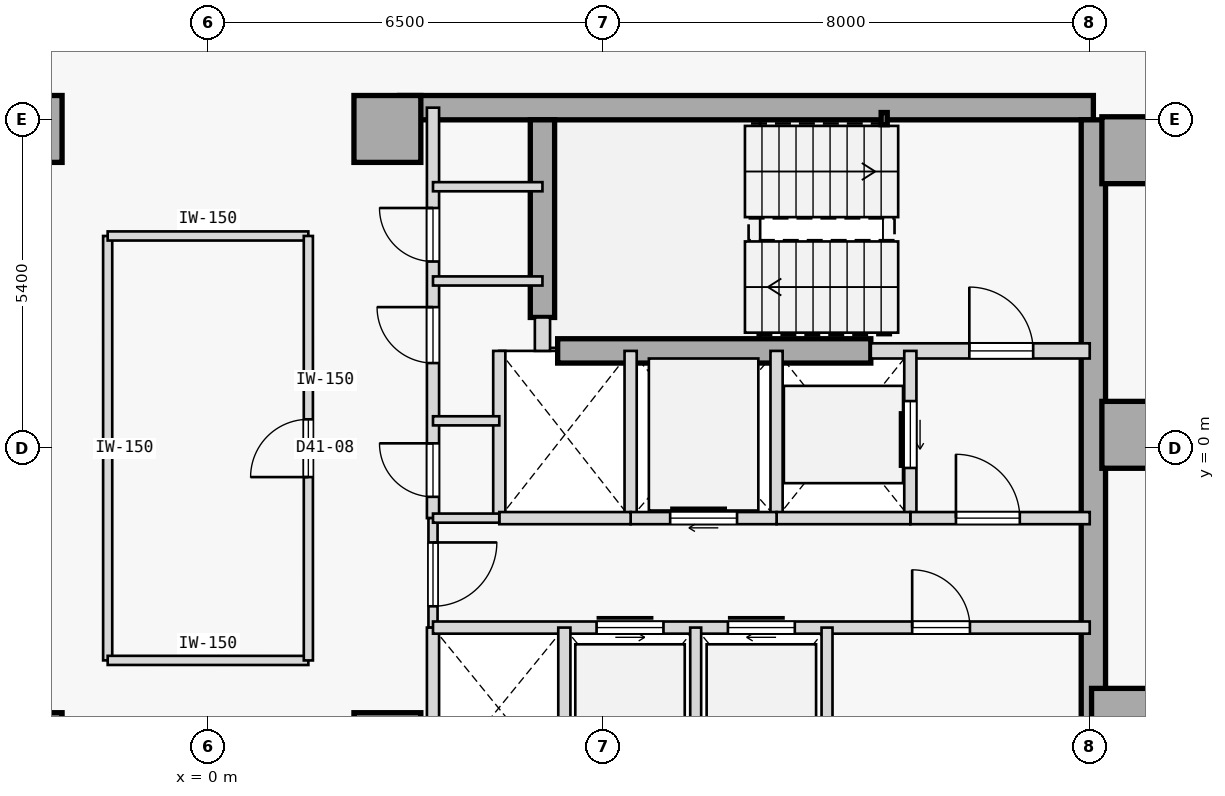
"""IFC4 building model, lengths in metres.
Left out: names, types, materials, properties, quantities, classifications, styles, units other than length and angle.
Written with IfcOpenShell. Run it as: python <this file> out.ifc"""

import sys

from ifc_helpers import new_model, si_unit, direction, frame, frame_2d, origin, origin_2d, place, context, subcontext, project, spatial, rectangle, hollow_rectangle, extrude, element, fill, save


model = new_model("IFC4")
c1 = context("Model", 3, precision=1e-05, world=origin(), true_north=direction((0.0, 1.0)))
c2 = subcontext(c1, "Body", "Model", "MODEL_VIEW")
j1 = project(units=[si_unit("LENGTHUNIT", "METRE"), si_unit("PLANEANGLEUNIT", "RADIAN")], contexts=[c1])
p1 = place(None, origin())
s1 = spatial("IfcSite", under=j1, at=p1, CompositionType="ELEMENT")
p2 = place(p1, origin())
s2 = spatial("IfcBuilding", under=s1, at=p2, CompositionType="ELEMENT")
p3 = place(p2, frame((0.0, 0.0, 161.6)))
s3 = spatial("IfcBuildingStorey", under=s2, at=p3, CompositionType="ELEMENT", Elevation=161.6)
for number, where, z_axis, x_axis in (
    (1, (-2.95, -4.9, 0.0), (0.0, 0.0, 1.0), (1.0, 0.0, 0.0)),
    (2, (-2.95, 5.25, 0.0), (0.0, 0.0, 1.0), (1.0, 0.0, 0.0)),
    (3, (15.25, 4.9, 0.0), (0.0, 0.0, 1.0), (1.0, 0.0, 0.0)),
    (4, (15.25, 0.22, 0.0), (0.0, 0.0, 1.0), (1.0, 0.0, 0.0)),
    (5, (15.08, -4.5, 0.0), (0.0, 0.0, 1.0), (1.0, 0.0, 0.0)),
    (6, (2.95, -4.9, 0.0), (0.0, 0.0, 1.0), (1.0, 0.0, 0.0)),
    (7, (2.95, 5.25, 0.0), (0.0, 0.0, 1.0), (1.0, 0.0, 0.0)),
):
    element("IfcColumn", number, at=place(p3, frame(where, z_axis=z_axis, x_axis=x_axis)), inside=s3, PredefinedType="COLUMN", context=c2, shape_type="SweptSolid", body=[
        extrude(rectangle(XDim=1.1, YDim=1.1, at=origin_2d()), origin(), (0.0, 0.0, 1.0), 3.4),
    ])
p4 = place(p3, frame((3.15, 5.6, 0.0), z_axis=(0.0, 0.0, 1.0), x_axis=(1.0, 0.0, 0.0)))
e8 = element("IfcWall", 8, at=p4, inside=s3, PredefinedType="SHEAR", context=c2, shape_type="SweptSolid", body=[
    extrude(rectangle(XDim=11.41, YDim=0.4, at=frame_2d((5.705, 0.0))), origin(), (0.0, 0.0, 1.0), 3.175),
])
p5 = place(p3, frame((14.56, -5.4, 0.0), z_axis=(0.0, 0.0, 1.0), x_axis=(0.0, 1.0, 0.0)))
e9 = element("IfcWall", 9, at=p5, inside=s3, PredefinedType="SHEAR", context=c2, shape_type="SweptSolid", body=[
    extrude(rectangle(XDim=10.8, YDim=0.4, at=frame_2d((5.4, 0.0))), origin(), (0.0, 0.0, 1.0), 3.175),
])
p6 = place(p3, frame((5.5, 2.15, 0.0), z_axis=(0.0, 0.0, 1.0), x_axis=(0.0, 1.0, 0.0)))
e10 = element("IfcWall", 10, at=p6, inside=s3, PredefinedType="SHEAR", context=c2, shape_type="SweptSolid", body=[
    extrude(rectangle(XDim=3.25, YDim=0.4, at=frame_2d((1.625, 0.0))), origin(), (0.0, 0.0, 1.0), 3.175),
])
p7 = place(p3, frame((5.75, 1.6, 0.0), z_axis=(0.0, 0.0, 1.0), x_axis=(1.0, 0.0, 0.0)))
e11 = element("IfcWall", 11, at=p7, inside=s3, PredefinedType="SHEAR", context=c2, shape_type="SweptSolid", body=[
    extrude(rectangle(XDim=5.15, YDim=0.4, at=frame_2d((2.575, 0.0))), origin(), (0.0, 0.0, 1.0), 3.175),
])
p8 = place(p3, frame((11.12, 5.42, 0.0), z_axis=(0.0, 0.0, 1.0), x_axis=(1.0, 0.0, 0.0)))
e12 = element("IfcColumn", 12, at=p8, inside=s3, PredefinedType="COLUMN", context=c2, shape_type="SweptSolid", body=[
    extrude(hollow_rectangle(XDim=0.1, YDim=0.2, WallThickness=0.008, at=origin_2d()), origin(), (0.0, 0.0, 1.0), 3.4),
])
p9 = place(p3, frame((10.9, 1.6, 0.0), z_axis=(0.0, 0.0, 1.0), x_axis=(1.0, 0.0, 0.0)))
e13 = element("IfcWall", 13, at=p9, inside=s3, PredefinedType="STANDARD", context=c2, shape_type="SweptSolid", body=[
    extrude(rectangle(XDim=3.6, YDim=0.25, at=frame_2d((1.8, 0.0))), origin(), (0.0, 0.0, 1.0), 3.175),
])
p10 = place(p9, frame((1.62, 0.0, 0.0)))
e14 = element("IfcOpeningElement", 14, at=p10, cuts=e13, PredefinedType="OPENING", context=c2, shape_type="SweptSolid", body=[
    extrude(rectangle(XDim=1.05, YDim=2.15, at=frame_2d((0.525, 1.075))), frame((0.0, 0.135, 0.0), z_axis=(0.0, -1.0, 0.0), x_axis=(1.0, 0.0, 0.0)), (0.0, 0.0, 1.0), 0.27),
])
p11 = place(p3, frame((5.5, 1.6, 0.0), z_axis=(0.0, 0.0, 1.0), x_axis=(0.0, 1.0, 0.0)))
e15 = element("IfcWall", 15, at=p11, inside=s3, PredefinedType="STANDARD", context=c2, shape_type="SweptSolid", body=[
    extrude(rectangle(XDim=0.55, YDim=0.25, at=frame_2d((0.275, 0.0))), origin(), (0.0, 0.0, 1.0), 3.175),
])
p12 = place(p3, frame((3.7, -1.15, 0.0), z_axis=(0.0, 0.0, 1.0), x_axis=(0.0, 1.0, 0.0)))
e16 = element("IfcWall", 16, at=p12, inside=s3, PredefinedType="STANDARD", context=c2, shape_type="SweptSolid", body=[
    extrude(rectangle(XDim=6.75, YDim=0.2, at=frame_2d((3.375, 0.0))), origin(), (0.0, 0.0, 1.0), 3.175),
])
p13 = place(p12, frame((0.35, 0.0, 0.0)))
e17 = element("IfcOpeningElement", 17, at=p13, cuts=e16, PredefinedType="OPENING", context=c2, shape_type="SweptSolid", body=[
    extrude(rectangle(XDim=0.88, YDim=2.15, at=frame_2d((0.44, 1.075))), frame((0.0, 0.11, 0.0), z_axis=(0.0, -1.0, 0.0), x_axis=(1.0, 0.0, 0.0)), (0.0, 0.0, 1.0), 0.22),
])
p14 = place(p12, frame((2.55, 0.0, 0.0)))
e18 = element("IfcOpeningElement", 18, at=p14, cuts=e16, PredefinedType="OPENING", context=c2, shape_type="SweptSolid", body=[
    extrude(rectangle(XDim=0.92, YDim=2.15, at=frame_2d((0.46, 1.075))), frame((0.0, 0.11, 0.0), z_axis=(0.0, -1.0, 0.0), x_axis=(1.0, 0.0, 0.0)), (0.0, 0.0, 1.0), 0.22),
])
p15 = place(p12, frame((4.22, 0.0, 0.0)))
e19 = element("IfcOpeningElement", 19, at=p15, cuts=e16, PredefinedType="OPENING", context=c2, shape_type="SweptSolid", body=[
    extrude(rectangle(XDim=0.88, YDim=2.15, at=frame_2d((0.44, 1.075))), frame((0.0, 0.11, 0.0), z_axis=(0.0, -1.0, 0.0), x_axis=(1.0, 0.0, 0.0)), (0.0, 0.0, 1.0), 0.22),
])
p16 = place(p3, frame((3.7, -2.95, 0.0), z_axis=(0.0, 0.0, 1.0), x_axis=(0.0, 1.0, 0.0)))
e20 = element("IfcWall", 20, at=p16, inside=s3, PredefinedType="PARTITIONING", context=c2, shape_type="SweptSolid", body=[
    extrude(rectangle(XDim=1.8, YDim=0.15, at=frame_2d((0.9, 0.0))), origin(), (0.0, 0.0, 1.0), 3.175),
])
p17 = place(p16, frame((0.35, 0.0, 0.0)))
e21 = element("IfcOpeningElement", 21, at=p17, cuts=e20, PredefinedType="OPENING", context=c2, shape_type="SweptSolid", body=[
    extrude(rectangle(XDim=1.05, YDim=2.18, at=frame_2d((0.525, 1.09))), frame((0.0, 0.085, 0.0), z_axis=(0.0, -1.0, 0.0), x_axis=(1.0, 0.0, 0.0)), (0.0, 0.0, 1.0), 0.17),
])
p18 = place(p3, frame((3.7, -5.6, 0.0), z_axis=(0.0, 0.0, 1.0), x_axis=(0.0, 1.0, 0.0)))
e22 = element("IfcWall", 22, at=p18, inside=s3, PredefinedType="STANDARD", context=c2, shape_type="SweptSolid", body=[
    extrude(rectangle(XDim=2.65, YDim=0.2, at=frame_2d((1.325, 0.0))), origin(), (0.0, 0.0, 1.0), 3.175),
])
p19 = place(p3, frame((11.55, -1.15, 0.0), z_axis=(0.0, 0.0, 1.0), x_axis=(0.0, 1.0, 0.0)))
e23 = element("IfcWall", 23, at=p19, inside=s3, PredefinedType="STANDARD", context=c2, shape_type="SweptSolid", body=[
    extrude(rectangle(XDim=2.75, YDim=0.2, at=frame_2d((1.375, 0.0))), origin(), (0.0, 0.0, 1.0), 3.175),
])
p20 = place(p19, frame((0.825, 0.0, 0.0)))
e24 = element("IfcOpeningElement", 24, at=p20, cuts=e23, PredefinedType="OPENING", context=c2, shape_type="SweptSolid", body=[
    extrude(rectangle(XDim=1.1, YDim=2.15, at=frame_2d((0.55, 1.075))), frame((0.0, 0.11, 0.0), z_axis=(0.0, -1.0, 0.0), x_axis=(1.0, 0.0, 0.0)), (0.0, 0.0, 1.0), 0.22),
])
p21 = place(p3, frame((9.35, -1.15, 0.0), z_axis=(0.0, 0.0, 1.0), x_axis=(0.0, 1.0, 0.0)))
e25 = element("IfcWall", 25, at=p21, inside=s3, PredefinedType="STANDARD", context=c2, shape_type="SweptSolid", body=[
    extrude(rectangle(XDim=2.75, YDim=0.2, at=frame_2d((1.375, 0.0))), origin(), (0.0, 0.0, 1.0), 3.175),
])
p22 = place(p3, frame((11.55, -1.15, 0.0), z_axis=(0.0, 0.0, 1.0), x_axis=(1.0, 0.0, 0.0)))
e26 = element("IfcWall", 26, at=p22, inside=s3, PredefinedType="STANDARD", context=c2, shape_type="SweptSolid", body=[
    extrude(rectangle(XDim=2.95, YDim=0.2, at=frame_2d((1.475, 0.0))), origin(), (0.0, 0.0, 1.0), 3.175),
])
p23 = place(p22, frame((0.75, 0.0, 0.0)))
e27 = element("IfcOpeningElement", 27, at=p23, cuts=e26, PredefinedType="OPENING", context=c2, shape_type="SweptSolid", body=[
    extrude(rectangle(XDim=1.05, YDim=2.18, at=frame_2d((0.525, 1.09))), frame((0.0, 0.11, 0.0), z_axis=(0.0, -1.0, 0.0), x_axis=(1.0, 0.0, 0.0)), (0.0, 0.0, 1.0), 0.22),
])
p24 = place(p3, frame((9.35, -1.15, 0.0), z_axis=(0.0, 0.0, 1.0), x_axis=(1.0, 0.0, 0.0)))
e28 = element("IfcWall", 28, at=p24, inside=s3, PredefinedType="STANDARD", context=c2, shape_type="SweptSolid", body=[
    extrude(rectangle(XDim=2.2, YDim=0.2, at=frame_2d((1.1, 0.0))), origin(), (0.0, 0.0, 1.0), 3.175),
])
p25 = place(p3, frame((6.95, -1.15, 0.0), z_axis=(0.0, 0.0, 1.0), x_axis=(0.0, 1.0, 0.0)))
e29 = element("IfcWall", 29, at=p25, inside=s3, PredefinedType="STANDARD", context=c2, shape_type="SweptSolid", body=[
    extrude(rectangle(XDim=2.75, YDim=0.2, at=frame_2d((1.375, 0.0))), origin(), (0.0, 0.0, 1.0), 3.175),
])
p26 = place(p3, frame((6.95, -1.15, 0.0), z_axis=(0.0, 0.0, 1.0), x_axis=(1.0, 0.0, 0.0)))
e30 = element("IfcWall", 30, at=p26, inside=s3, PredefinedType="STANDARD", context=c2, shape_type="SweptSolid", body=[
    extrude(rectangle(XDim=2.4, YDim=0.2, at=frame_2d((1.2, 0.0))), origin(), (0.0, 0.0, 1.0), 3.175),
])
p27 = place(p26, frame((0.65, 0.0, 0.0)))
e31 = element("IfcOpeningElement", 31, at=p27, cuts=e30, PredefinedType="OPENING", context=c2, shape_type="SweptSolid", body=[
    extrude(rectangle(XDim=1.1, YDim=2.15, at=frame_2d((0.55, 1.075))), frame((0.0, 0.11, 0.0), z_axis=(0.0, -1.0, 0.0), x_axis=(1.0, 0.0, 0.0)), (0.0, 0.0, 1.0), 0.22),
])
p28 = place(p3, frame((4.79, -1.15, 0.0), z_axis=(0.0, 0.0, 1.0), x_axis=(0.0, 1.0, 0.0)))
e32 = element("IfcWall", 32, at=p28, inside=s3, PredefinedType="STANDARD", context=c2, shape_type="SweptSolid", body=[
    extrude(rectangle(XDim=2.75, YDim=0.2, at=frame_2d((1.375, 0.0))), origin(), (0.0, 0.0, 1.0), 3.175),
])
p29 = place(p3, frame((4.79, -1.15, 0.0), z_axis=(0.0, 0.0, 1.0), x_axis=(1.0, 0.0, 0.0)))
e33 = element("IfcWall", 33, at=p29, inside=s3, PredefinedType="STANDARD", context=c2, shape_type="SweptSolid", body=[
    extrude(rectangle(XDim=2.16, YDim=0.2, at=frame_2d((1.08, 0.0))), origin(), (0.0, 0.0, 1.0), 3.175),
])
p30 = place(p3, frame((3.7, -1.15, 0.0), z_axis=(0.0, 0.0, 1.0), x_axis=(1.0, 0.0, 0.0)))
e34 = element("IfcWall", 34, at=p30, inside=s3, PredefinedType="PARTITIONING", context=c2, shape_type="SweptSolid", body=[
    extrude(rectangle(XDim=1.09, YDim=0.15, at=frame_2d((0.545, 0.0))), origin(), (0.0, 0.0, 1.0), 3.175),
])
p31 = place(p3, frame((3.7, -2.95, 0.0), z_axis=(0.0, 0.0, 1.0), x_axis=(1.0, 0.0, 0.0)))
e35 = element("IfcWall", 35, at=p31, inside=s3, PredefinedType="STANDARD", context=c2, shape_type="SweptSolid", body=[
    extrude(rectangle(XDim=10.8, YDim=0.2, at=frame_2d((5.4, 0.0))), origin(), (0.0, 0.0, 1.0), 3.175),
])
p32 = place(p31, frame((2.69, 0.0, 0.0)))
e36 = element("IfcOpeningElement", 36, at=p32, cuts=e35, PredefinedType="OPENING", context=c2, shape_type="SweptSolid", body=[
    extrude(rectangle(XDim=1.1, YDim=2.15, at=frame_2d((0.55, 1.075))), frame((0.0, 0.11, 0.0), z_axis=(0.0, -1.0, 0.0), x_axis=(1.0, 0.0, 0.0)), (0.0, 0.0, 1.0), 0.22),
])
p33 = place(p31, frame((4.85, 0.0, 0.0)))
e37 = element("IfcOpeningElement", 37, at=p33, cuts=e35, PredefinedType="OPENING", context=c2, shape_type="SweptSolid", body=[
    extrude(rectangle(XDim=1.1, YDim=2.15, at=frame_2d((0.55, 1.075))), frame((0.0, 0.11, 0.0), z_axis=(0.0, -1.0, 0.0), x_axis=(1.0, 0.0, 0.0)), (0.0, 0.0, 1.0), 0.22),
])
p34 = place(p31, frame((7.88, 0.0, 0.0)))
e38 = element("IfcOpeningElement", 38, at=p34, cuts=e35, PredefinedType="OPENING", context=c2, shape_type="SweptSolid", body=[
    extrude(rectangle(XDim=0.95, YDim=2.15, at=frame_2d((0.475, 1.075))), frame((0.0, 0.11, 0.0), z_axis=(0.0, -1.0, 0.0), x_axis=(1.0, 0.0, 0.0)), (0.0, 0.0, 1.0), 0.22),
])
p35 = place(p3, frame((5.86, -5.6, 0.0), z_axis=(0.0, 0.0, 1.0), x_axis=(0.0, 1.0, 0.0)))
e39 = element("IfcWall", 39, at=p35, inside=s3, PredefinedType="STANDARD", context=c2, shape_type="SweptSolid", body=[
    extrude(rectangle(XDim=2.65, YDim=0.2, at=frame_2d((1.325, 0.0))), origin(), (0.0, 0.0, 1.0), 3.175),
])
for number, where, z_axis, x_axis in (
    (40, (10.18, -5.6, 0.0), (0.0, 0.0, 1.0), (0.0, 1.0, 0.0)),
    (41, (8.02, -5.6, 0.0), (0.0, 0.0, 1.0), (0.0, 1.0, 0.0)),
):
    element("IfcWall", number, at=place(p3, frame(where, z_axis=z_axis, x_axis=x_axis)), inside=s3, PredefinedType="STANDARD", context=c2, shape_type="SweptSolid", body=[
        extrude(rectangle(XDim=2.65, YDim=0.18, at=frame_2d((1.325, 0.0))), origin(), (0.0, 0.0, 1.0), 3.175),
    ])
p36 = place(p3, frame((3.7, 4.3, 0.0), z_axis=(0.0, 0.0, 1.0), x_axis=(1.0, 0.0, 0.0)))
e42 = element("IfcWall", 42, at=p36, inside=s3, PredefinedType="PARTITIONING", context=c2, shape_type="SweptSolid", body=[
    extrude(rectangle(XDim=1.8, YDim=0.15, at=frame_2d((0.9, 0.0))), origin(), (0.0, 0.0, 1.0), 3.175),
])
p37 = place(p3, frame((3.7, 0.45, 0.0), z_axis=(0.0, 0.0, 1.0), x_axis=(1.0, 0.0, 0.0)))
e43 = element("IfcWall", 43, at=p37, inside=s3, PredefinedType="PARTITIONING", context=c2, shape_type="SweptSolid", body=[
    extrude(rectangle(XDim=1.09, YDim=0.15, at=frame_2d((0.545, 0.0))), origin(), (0.0, 0.0, 1.0), 3.175),
])
p38 = place(p3, frame((3.7, 2.75, 0.0), z_axis=(0.0, 0.0, 1.0), x_axis=(1.0, 0.0, 0.0)))
e44 = element("IfcWall", 44, at=p38, inside=s3, PredefinedType="PARTITIONING", context=c2, shape_type="SweptSolid", body=[
    extrude(rectangle(XDim=1.8, YDim=0.15, at=frame_2d((0.9, 0.0))), origin(), (0.0, 0.0, 1.0), 3.175),
])
p39 = place(p3, frame((-1.65, -3.49, 0.0), z_axis=(0.0, 0.0, 1.0), x_axis=(-3.4979712e-05, 0.999999999388, 0.0)))
e45 = element("IfcWall", 45, at=p39, inside=s3, PredefinedType="PARTITIONING", context=c2, shape_type="SweptSolid", body=[
    extrude(rectangle(XDim=6.979, YDim=0.15, at=frame_2d((3.49, 0.0))), origin(), (0.0, 0.0, 1.0), 3.175),
])
p40 = place(p3, frame((-1.65, -3.49, 0.0), z_axis=(0.0, 0.0, 1.0), x_axis=(0.999999975374, -0.000221926315, 0.0)))
e46 = element("IfcWall", 46, at=p40, inside=s3, PredefinedType="PARTITIONING", context=c2, shape_type="SweptSolid", body=[
    extrude(rectangle(XDim=3.3, YDim=0.15, at=frame_2d((1.65, 0.0))), origin(), (0.0, 0.0, 1.0), 3.175),
])
p41 = place(p3, frame((-1.65, 3.49, 0.0), z_axis=(0.0, 0.0, 1.0), x_axis=(1.0, 0.0, 0.0)))
e47 = element("IfcWall", 47, at=p41, inside=s3, PredefinedType="PARTITIONING", context=c2, shape_type="SweptSolid", body=[
    extrude(rectangle(XDim=3.3, YDim=0.15, at=frame_2d((1.65, 0.0))), origin(), (0.0, 0.0, 1.0), 3.175),
])
p42 = place(p3, frame((1.65, -3.49, 0.0), z_axis=(0.0, 0.0, 1.0), x_axis=(-6.9952083e-05, 0.999999997553, 0.0)))
e48 = element("IfcWall", 48, at=p42, inside=s3, PredefinedType="PARTITIONING", context=c2, shape_type="SweptSolid", body=[
    extrude(rectangle(XDim=6.98, YDim=0.15, at=frame_2d((3.49, 0.0))), origin(), (0.0, 0.0, 1.0), 3.175),
])
p43 = place(p42, frame((3.015, 0.0, 0.0)))
e49 = element("IfcOpeningElement", 49, at=p43, cuts=e48, PredefinedType="OPENING", context=c2, shape_type="SweptSolid", body=[
    extrude(rectangle(XDim=0.95, YDim=2.15, at=frame_2d((0.475, 1.075))), frame((0.0, 0.085, 0.0), z_axis=(0.0, -1.0, 0.0), x_axis=(1.0, 0.0, 0.0)), (0.0, 0.0, 1.0), 0.17),
])
p44 = place(p10, origin())
e50 = element("IfcDoor", 50, at=p44, inside=s3, OperationType="SINGLE_SWING_LEFT", PredefinedType="DOOR", context=c2, shape_type="SweptSolid", body=[
    extrude(rectangle(XDim=1.05, YDim=2.15, at=frame_2d((0.525, 1.075))), frame((0.0, 0.025, 0.0), z_axis=(0.0, -1.0, 0.0), x_axis=(1.0, 0.0, 0.0)), (0.0, 0.0, 1.0), 0.05),
])
fill(e14, e50)
p45 = place(p23, origin())
e51 = element("IfcDoor", 51, at=p45, inside=s3, OperationType="SINGLE_SWING_LEFT", PredefinedType="DOOR", context=c2, shape_type="SweptSolid", body=[
    extrude(rectangle(XDim=1.05, YDim=2.18, at=frame_2d((0.525, 1.09))), frame((0.0, 0.025, 0.0), z_axis=(0.0, -1.0, 0.0), x_axis=(1.0, 0.0, 0.0)), (0.0, 0.0, 1.0), 0.05),
])
fill(e27, e51)
p46 = place(p17, frame((1.05, 0.0, 0.0), z_axis=(0.0, 0.0, 1.0), x_axis=(-1.0, 0.0, 0.0)))
e52 = element("IfcDoor", 52, at=p46, inside=s3, OperationType="SINGLE_SWING_RIGHT", PredefinedType="DOOR", context=c2, shape_type="SweptSolid", body=[
    extrude(rectangle(XDim=1.05, YDim=2.18, at=frame_2d((0.525, 1.09))), frame((0.0, 0.025, 0.0), z_axis=(0.0, -1.0, 0.0), x_axis=(1.0, 0.0, 0.0)), (0.0, 0.0, 1.0), 0.05),
])
fill(e21, e52)
p47 = place(p20, origin())
e53 = element("IfcDoor", 53, at=p47, inside=s3, OperationType="SLIDING_TO_RIGHT", PredefinedType="DOOR", context=c2, shape_type="SweptSolid", body=[
    extrude(rectangle(XDim=1.1, YDim=2.15, at=frame_2d((0.55, 1.075))), frame((0.0, 0.025, 0.0), z_axis=(0.0, -1.0, 0.0), x_axis=(1.0, 0.0, 0.0)), (0.0, 0.0, 1.0), 0.05),
])
fill(e24, e53)
p48 = place(p27, origin())
e54 = element("IfcDoor", 54, at=p48, inside=s3, OperationType="SLIDING_TO_RIGHT", PredefinedType="DOOR", context=c2, shape_type="SweptSolid", body=[
    extrude(rectangle(XDim=1.1, YDim=2.15, at=frame_2d((0.55, 1.075))), frame((0.0, 0.025, 0.0), z_axis=(0.0, -1.0, 0.0), x_axis=(1.0, 0.0, 0.0)), (0.0, 0.0, 1.0), 0.05),
])
fill(e31, e54)
p49 = place(p32, origin())
e55 = element("IfcDoor", 55, at=p49, inside=s3, OperationType="SLIDING_TO_LEFT", PredefinedType="DOOR", context=c2, shape_type="SweptSolid", body=[
    extrude(rectangle(XDim=1.1, YDim=2.15, at=frame_2d((0.55, 1.075))), frame((0.0, 0.025, 0.0), z_axis=(0.0, -1.0, 0.0), x_axis=(1.0, 0.0, 0.0)), (0.0, 0.0, 1.0), 0.05),
])
fill(e36, e55)
p50 = place(p33, origin())
e56 = element("IfcDoor", 56, at=p50, inside=s3, OperationType="SLIDING_TO_RIGHT", PredefinedType="DOOR", context=c2, shape_type="SweptSolid", body=[
    extrude(rectangle(XDim=1.1, YDim=2.15, at=frame_2d((0.55, 1.075))), frame((0.0, 0.025, 0.0), z_axis=(0.0, -1.0, 0.0), x_axis=(1.0, 0.0, 0.0)), (0.0, 0.0, 1.0), 0.05),
])
fill(e37, e56)
p51 = place(p34, origin())
e57 = element("IfcDoor", 57, at=p51, inside=s3, OperationType="SINGLE_SWING_LEFT", PredefinedType="DOOR", context=c2, shape_type="SweptSolid", body=[
    extrude(rectangle(XDim=0.95, YDim=2.15, at=frame_2d((0.475, 1.075))), frame((0.0, 0.025, 0.0), z_axis=(0.0, -1.0, 0.0), x_axis=(1.0, 0.0, 0.0)), (0.0, 0.0, 1.0), 0.05),
])
fill(e38, e57)
p52 = place(p13, origin())
e58 = element("IfcDoor", 58, at=p52, inside=s3, OperationType="SINGLE_SWING_RIGHT", PredefinedType="DOOR", context=c2, shape_type="SweptSolid", body=[
    extrude(rectangle(XDim=0.88, YDim=2.15, at=frame_2d((0.44, 1.075))), frame((0.0, 0.025, 0.0), z_axis=(0.0, -1.0, 0.0), x_axis=(1.0, 0.0, 0.0)), (0.0, 0.0, 1.0), 0.05),
])
fill(e17, e58)
p53 = place(p14, origin())
e59 = element("IfcDoor", 59, at=p53, inside=s3, OperationType="SINGLE_SWING_RIGHT", PredefinedType="DOOR", context=c2, shape_type="SweptSolid", body=[
    extrude(rectangle(XDim=0.92, YDim=2.15, at=frame_2d((0.46, 1.075))), frame((0.0, 0.025, 0.0), z_axis=(0.0, -1.0, 0.0), x_axis=(1.0, 0.0, 0.0)), (0.0, 0.0, 1.0), 0.05),
])
fill(e18, e59)
p54 = place(p15, origin())
e60 = element("IfcDoor", 60, at=p54, inside=s3, OperationType="SINGLE_SWING_RIGHT", PredefinedType="DOOR", context=c2, shape_type="SweptSolid", body=[
    extrude(rectangle(XDim=0.88, YDim=2.15, at=frame_2d((0.44, 1.075))), frame((0.0, 0.025, 0.0), z_axis=(0.0, -1.0, 0.0), x_axis=(1.0, 0.0, 0.0)), (0.0, 0.0, 1.0), 0.05),
])
fill(e19, e60)
p55 = place(p43, origin())
e61 = element("IfcDoor", 61, at=p55, inside=s3, OperationType="SINGLE_SWING_LEFT", PredefinedType="DOOR", context=c2, shape_type="SweptSolid", body=[
    extrude(rectangle(XDim=0.95, YDim=2.15, at=frame_2d((0.475, 1.075))), frame((0.0, 0.025, 0.0), z_axis=(0.0, -1.0, 0.0), x_axis=(1.0, 0.0, 0.0)), (0.0, 0.0, 1.0), 0.05),
])
fill(e49, e61)
save(model, sys.argv[1])
